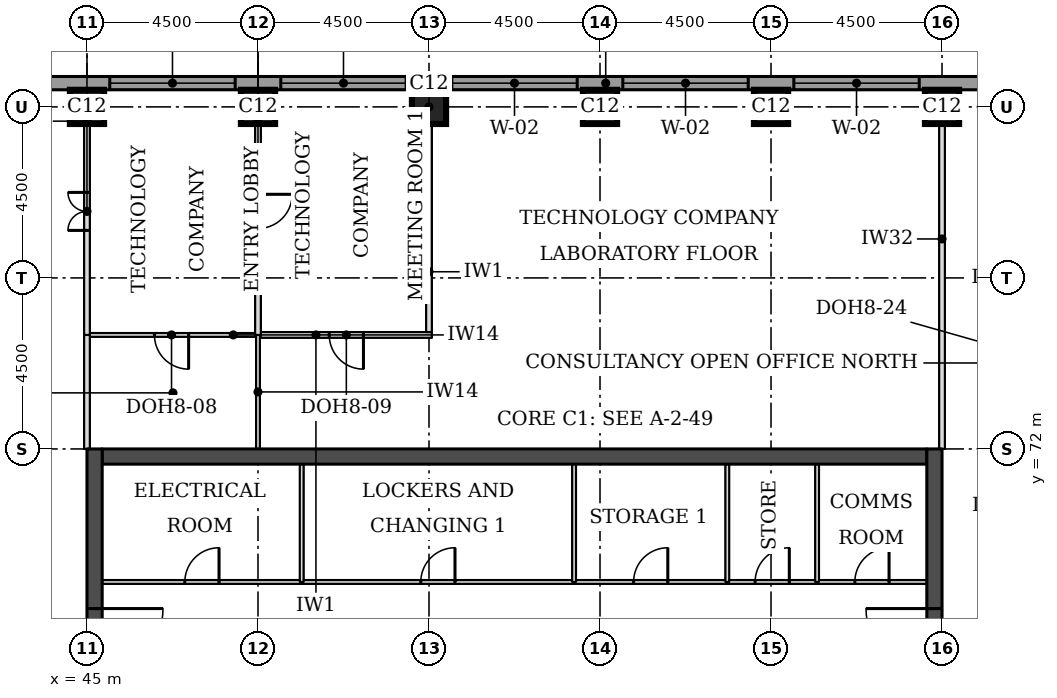
"""IFC4 building model, lengths in metres.
Left out: names, types, materials, properties, quantities, classifications, styles, units other than length and angle.
Written with IfcOpenShell. Run it as: python <this file> out.ifc"""

import sys

from ifc_helpers import new_model, si_unit, direction, frame, frame_2d, origin, origin_2d, place, context, subcontext, project, spatial, rectangle, extrude, element, fill, save


model = new_model("IFC4")
c1 = context("Model", 3, precision=1e-05, world=origin(), true_north=direction((0.0, 1.0)))
c2 = subcontext(c1, "Body", "Model", "MODEL_VIEW")
j1 = project(units=[si_unit("LENGTHUNIT", "METRE"), si_unit("PLANEANGLEUNIT", "RADIAN")], contexts=[c1])
p1 = place(None, origin())
s1 = spatial("IfcSite", under=j1, at=p1, CompositionType="ELEMENT")
p2 = place(p1, origin())
s2 = spatial("IfcBuilding", under=s1, at=p2, CompositionType="ELEMENT")
p3 = place(p2, frame((0.0, 0.0, 199.5)))
s3 = spatial("IfcBuildingStorey", under=s2, at=p3, CompositionType="ELEMENT", Elevation=199.5)
for number, where, z_axis, x_axis in (
    (1, (45.0, 81.0, 0.0), (0.0, 0.0, 1.0), (1.0, 0.0, 0.0)),
    (2, (49.5, 81.0, 0.0), (0.0, 0.0, 1.0), (1.0, 0.0, 0.0)),
    (3, (54.0, 81.0, 0.0), (0.0, 0.0, 1.0), (1.0, 0.0, 0.0)),
    (4, (58.5, 81.0, 0.0), (0.0, 0.0, 1.0), (1.0, 0.0, 0.0)),
    (5, (63.0, 81.0, 0.0), (0.0, 0.0, 1.0), (1.0, 0.0, 0.0)),
    (6, (67.5, 81.0, 0.0), (0.0, 0.0, 1.0), (1.0, 0.0, 0.0)),
):
    element("IfcColumn", number, at=place(p3, frame(where, z_axis=z_axis, x_axis=x_axis)), inside=s3, PredefinedType="COLUMN", context=c2, shape_type="SweptSolid", body=[
        extrude(rectangle(XDim=0.9, YDim=0.9, at=origin_2d()), origin(), (0.0, 0.0, 1.0), 3.7),
    ])
p4 = place(p3, frame((45.4, 71.8, 0.0), z_axis=(0.0, 0.0, 1.0), x_axis=(1.0, 0.0, 0.0)))
e7 = element("IfcWall", 7, at=p4, inside=s3, PredefinedType="SHEAR", context=c2, shape_type="SweptSolid", body=[
    extrude(rectangle(XDim=21.7, YDim=0.4, at=frame_2d((10.85, 0.0))), origin(), (0.0, 0.0, 1.0), 3.7),
])
p5 = place(p3, frame((45.2, 49.5, 0.0), z_axis=(0.0, 0.0, 1.0), x_axis=(0.0, 1.0, 0.0)))
e8 = element("IfcWall", 8, at=p5, inside=s3, PredefinedType="SHEAR", context=c2, shape_type="SweptSolid", body=[
    extrude(rectangle(XDim=22.5, YDim=0.4, at=frame_2d((11.25, 0.0))), origin(), (0.0, 0.0, 1.0), 3.7),
])
p6 = place(p5, frame((4.2, 0.0, 0.0)))
e9 = element("IfcOpeningElement", 9, at=p6, cuts=e8, PredefinedType="OPENING", context=c2, shape_type="SweptSolid", body=[
    extrude(rectangle(XDim=1.8, YDim=2.1, at=frame_2d((0.9, 1.05))), frame((0.0, 0.21, 0.0), z_axis=(0.0, -1.0, 0.0), x_axis=(1.0, 0.0, 0.0)), (0.0, 0.0, 1.0), 0.42),
])
p7 = place(p5, frame((6.9, 0.0, 0.0)))
e10 = element("IfcOpeningElement", 10, at=p7, cuts=e8, PredefinedType="OPENING", context=c2, shape_type="SweptSolid", body=[
    extrude(rectangle(XDim=1.1, YDim=2.1, at=frame_2d((0.55, 1.05))), frame((0.0, 0.21, 0.0), z_axis=(0.0, -1.0, 0.0), x_axis=(1.0, 0.0, 0.0)), (0.0, 0.0, 1.0), 0.42),
])
p8 = place(p5, frame((13.6, 0.0, 0.0)))
e11 = element("IfcOpeningElement", 11, at=p8, cuts=e8, PredefinedType="OPENING", context=c2, shape_type="SweptSolid", body=[
    extrude(rectangle(XDim=1.1, YDim=2.1, at=frame_2d((0.55, 1.05))), frame((0.0, 0.21, 0.0), z_axis=(0.0, -1.0, 0.0), x_axis=(1.0, 0.0, 0.0)), (0.0, 0.0, 1.0), 0.42),
])
p9 = place(p5, frame((16.5, 0.0, 0.0)))
e12 = element("IfcOpeningElement", 12, at=p9, cuts=e8, PredefinedType="OPENING", context=c2, shape_type="SweptSolid", body=[
    extrude(rectangle(XDim=1.8, YDim=2.1, at=frame_2d((0.9, 1.05))), frame((0.0, 0.21, 0.0), z_axis=(0.0, -1.0, 0.0), x_axis=(1.0, 0.0, 0.0)), (0.0, 0.0, 1.0), 0.42),
])
p10 = place(p3, frame((67.3, 49.5, 0.0), z_axis=(0.0, 0.0, 1.0), x_axis=(0.0, 1.0, 0.0)))
e13 = element("IfcWall", 13, at=p10, inside=s3, PredefinedType="SHEAR", context=c2, shape_type="SweptSolid", body=[
    extrude(rectangle(XDim=22.5, YDim=0.4, at=frame_2d((11.25, 0.0))), origin(), (0.0, 0.0, 1.0), 3.7),
])
p11 = place(p10, frame((4.2, 0.0, 0.0)))
e14 = element("IfcOpeningElement", 14, at=p11, cuts=e13, PredefinedType="OPENING", context=c2, shape_type="SweptSolid", body=[
    extrude(rectangle(XDim=1.8, YDim=2.1, at=frame_2d((0.9, 1.05))), frame((0.0, 0.21, 0.0), z_axis=(0.0, -1.0, 0.0), x_axis=(1.0, 0.0, 0.0)), (0.0, 0.0, 1.0), 0.42),
])
p12 = place(p10, frame((6.9, 0.0, 0.0)))
e15 = element("IfcOpeningElement", 15, at=p12, cuts=e13, PredefinedType="OPENING", context=c2, shape_type="SweptSolid", body=[
    extrude(rectangle(XDim=1.1, YDim=2.1, at=frame_2d((0.55, 1.05))), frame((0.0, 0.21, 0.0), z_axis=(0.0, -1.0, 0.0), x_axis=(1.0, 0.0, 0.0)), (0.0, 0.0, 1.0), 0.42),
])
p13 = place(p10, frame((13.6, 0.0, 0.0)))
e16 = element("IfcOpeningElement", 16, at=p13, cuts=e13, PredefinedType="OPENING", context=c2, shape_type="SweptSolid", body=[
    extrude(rectangle(XDim=1.1, YDim=2.1, at=frame_2d((0.55, 1.05))), frame((0.0, 0.21, 0.0), z_axis=(0.0, -1.0, 0.0), x_axis=(1.0, 0.0, 0.0)), (0.0, 0.0, 1.0), 0.42),
])
p14 = place(p10, frame((16.5, 0.0, 0.0)))
e17 = element("IfcOpeningElement", 17, at=p14, cuts=e13, PredefinedType="OPENING", context=c2, shape_type="SweptSolid", body=[
    extrude(rectangle(XDim=1.8, YDim=2.1, at=frame_2d((0.9, 1.05))), frame((0.0, 0.21, 0.0), z_axis=(0.0, -1.0, 0.0), x_axis=(1.0, 0.0, 0.0)), (0.0, 0.0, 1.0), 0.42),
])
p15 = place(p3, frame((72.331, 81.625, 0.0), z_axis=(0.0, 0.0, 1.0), x_axis=(-1.0, 0.0, 0.0)))
e18 = element("IfcWall", 18, at=p15, inside=s3, PredefinedType="STANDARD", context=c2, shape_type="SweptSolid", body=[
    extrude(rectangle(XDim=32.163, YDim=0.35, at=frame_2d((16.081, 0.0))), origin(), (0.0, 0.0, 1.0), 3.525),
])
p16 = place(p15, frame((5.431, 0.0, 0.9)))
e19 = element("IfcOpeningElement", 19, at=p16, cuts=e18, PredefinedType="OPENING", context=c2, shape_type="SweptSolid", body=[
    extrude(rectangle(XDim=3.3, YDim=1.9, at=frame_2d((1.65, 0.95))), frame((0.0, 0.185, 0.0), z_axis=(0.0, -1.0, 0.0), x_axis=(1.0, 0.0, 0.0)), (0.0, 0.0, 1.0), 0.37),
])
p17 = place(p15, frame((9.931, 0.0, 0.9)))
e20 = element("IfcOpeningElement", 20, at=p17, cuts=e18, PredefinedType="OPENING", context=c2, shape_type="SweptSolid", body=[
    extrude(rectangle(XDim=3.3, YDim=1.9, at=frame_2d((1.65, 0.95))), frame((0.0, 0.185, 0.0), z_axis=(0.0, -1.0, 0.0), x_axis=(1.0, 0.0, 0.0)), (0.0, 0.0, 1.0), 0.37),
])
p18 = place(p15, frame((14.431, 0.0, 0.9)))
e21 = element("IfcOpeningElement", 21, at=p18, cuts=e18, PredefinedType="OPENING", context=c2, shape_type="SweptSolid", body=[
    extrude(rectangle(XDim=3.3, YDim=1.9, at=frame_2d((1.65, 0.95))), frame((0.0, 0.185, 0.0), z_axis=(0.0, -1.0, 0.0), x_axis=(1.0, 0.0, 0.0)), (0.0, 0.0, 1.0), 0.37),
])
p19 = place(p15, frame((18.931, 0.0, 0.9)))
e22 = element("IfcOpeningElement", 22, at=p19, cuts=e18, PredefinedType="OPENING", context=c2, shape_type="SweptSolid", body=[
    extrude(rectangle(XDim=3.3, YDim=1.9, at=frame_2d((1.65, 0.95))), frame((0.0, 0.185, 0.0), z_axis=(0.0, -1.0, 0.0), x_axis=(1.0, 0.0, 0.0)), (0.0, 0.0, 1.0), 0.37),
])
p20 = place(p15, frame((23.431, 0.0, 0.9)))
e23 = element("IfcOpeningElement", 23, at=p20, cuts=e18, PredefinedType="OPENING", context=c2, shape_type="SweptSolid", body=[
    extrude(rectangle(XDim=3.3, YDim=1.9, at=frame_2d((1.65, 0.95))), frame((0.0, 0.185, 0.0), z_axis=(0.0, -1.0, 0.0), x_axis=(1.0, 0.0, 0.0)), (0.0, 0.0, 1.0), 0.37),
])
p21 = place(p3, frame((45.075, 75.0, 0.0), z_axis=(0.0, 0.0, 1.0), x_axis=(1.0, 0.0, 0.0)))
e24 = element("IfcWall", 24, at=p21, inside=s3, PredefinedType="PARTITIONING", context=c2, shape_type="SweptSolid", body=[
    extrude(rectangle(XDim=4.35, YDim=0.1, at=frame_2d((2.175, 0.0))), origin(), (0.0, 0.0, 1.0), 3.55),
])
p22 = place(p21, frame((1.7, 0.0, 0.0)))
e25 = element("IfcOpeningElement", 25, at=p22, cuts=e24, PredefinedType="OPENING", context=c2, shape_type="SweptSolid", body=[
    extrude(rectangle(XDim=0.9, YDim=2.1, at=frame_2d((0.45, 1.05))), frame((0.0, 0.06, 0.0), z_axis=(0.0, -1.0, 0.0), x_axis=(1.0, 0.0, 0.0)), (0.0, 0.0, 1.0), 0.12),
])
p23 = place(p3, frame((49.575, 75.0, 0.0), z_axis=(0.0, 0.0, 1.0), x_axis=(1.0, 0.0, 0.0)))
e26 = element("IfcWall", 26, at=p23, inside=s3, PredefinedType="PARTITIONING", context=c2, shape_type="SweptSolid", body=[
    extrude(rectangle(XDim=4.5, YDim=0.15, at=frame_2d((2.25, 0.0))), origin(), (0.0, 0.0, 1.0), 3.55),
])
p24 = place(p23, frame((1.8, 0.0, 0.0)))
e27 = element("IfcOpeningElement", 27, at=p24, cuts=e26, PredefinedType="OPENING", context=c2, shape_type="SweptSolid", body=[
    extrude(rectangle(XDim=0.9, YDim=2.1, at=frame_2d((0.45, 1.05))), frame((0.0, 0.085, 0.0), z_axis=(0.0, -1.0, 0.0), x_axis=(1.0, 0.0, 0.0)), (0.0, 0.0, 1.0), 0.17),
])
p25 = place(p3, frame((45.0, 72.0, 0.0), z_axis=(0.0, 0.0, 1.0), x_axis=(0.0, 1.0, 0.0)))
e28 = element("IfcWall", 28, at=p25, inside=s3, PredefinedType="PARTITIONING", context=c2, shape_type="SweptSolid", body=[
    extrude(rectangle(XDim=3.0, YDim=0.15, at=frame_2d((1.5, 0.0))), origin(), (0.0, 0.0, 1.0), 3.022),
])
p26 = place(p3, frame((49.5, 72.0, 0.0), z_axis=(0.0, 0.0, 1.0), x_axis=(0.0, 1.0, 0.0)))
e29 = element("IfcWall", 29, at=p26, inside=s3, PredefinedType="PARTITIONING", context=c2, shape_type="SweptSolid", body=[
    extrude(rectangle(XDim=3.0, YDim=0.1, at=frame_2d((1.5, 0.0))), origin(), (0.0, 0.0, 1.0), 3.55),
])
p27 = place(p3, frame((67.5, 72.0, 0.0), z_axis=(0.0, 0.0, 1.0), x_axis=(0.0, 1.0, 0.0)))
e30 = element("IfcWall", 30, at=p27, inside=s3, PredefinedType="PARTITIONING", context=c2, shape_type="SweptSolid", body=[
    extrude(rectangle(XDim=9.45, YDim=0.15, at=frame_2d((4.725, 0.0))), origin(), (0.0, 0.0, 1.0), 3.022),
])
p28 = place(p3, frame((45.0, 75.0, 0.0), z_axis=(0.0, 0.0, 1.0), x_axis=(0.0, 1.0, 0.0)))
e31 = element("IfcWall", 31, at=p28, inside=s3, PredefinedType="PARTITIONING", context=c2, shape_type="SweptSolid", body=[
    extrude(rectangle(XDim=6.45, YDim=0.15, at=frame_2d((3.225, 0.0))), origin(), (0.0, 0.0, 1.0), 3.022),
])
p29 = place(p28, frame((2.75, 0.0, 0.0)))
e32 = element("IfcOpeningElement", 32, at=p29, cuts=e31, PredefinedType="OPENING", context=c2, shape_type="SweptSolid", body=[
    extrude(rectangle(XDim=1.0, YDim=2.1, at=frame_2d((0.5, 1.05))), frame((0.0, 0.085, 0.0), z_axis=(0.0, -1.0, 0.0), x_axis=(1.0, 0.0, 0.0)), (0.0, 0.0, 1.0), 0.17),
])
p30 = place(p3, frame((49.5, 75.0, 0.0), z_axis=(0.0, 0.0, 1.0), x_axis=(0.0, 1.0, 0.0)))
e33 = element("IfcWall", 33, at=p30, inside=s3, PredefinedType="PARTITIONING", context=c2, shape_type="SweptSolid", body=[
    extrude(rectangle(XDim=6.45, YDim=0.15, at=frame_2d((3.225, 0.0))), origin(), (0.0, 0.0, 1.0), 3.55),
])
p31 = place(p30, frame((2.8, 0.0, 0.0)))
e34 = element("IfcOpeningElement", 34, at=p31, cuts=e33, PredefinedType="OPENING", context=c2, shape_type="SweptSolid", body=[
    extrude(rectangle(XDim=0.9, YDim=2.1, at=frame_2d((0.45, 1.05))), frame((0.0, 0.085, 0.0), z_axis=(0.0, -1.0, 0.0), x_axis=(1.0, 0.0, 0.0)), (0.0, 0.0, 1.0), 0.17),
])
p32 = place(p3, frame((54.0, 75.075, 0.0), z_axis=(0.0, 0.0, 1.0), x_axis=(0.0, 1.0, 0.0)))
e35 = element("IfcWall", 35, at=p32, inside=s3, PredefinedType="PARTITIONING", context=c2, shape_type="SweptSolid", body=[
    extrude(rectangle(XDim=6.375, YDim=0.15, at=frame_2d((3.188, 0.0))), origin(), (0.0, 0.0, 1.0), 3.55),
])
p33 = place(p3, frame((45.4, 68.5, 0.0), z_axis=(0.0, 0.0, 1.0), x_axis=(1.0, 0.0, 0.0)))
e36 = element("IfcWall", 36, at=p33, inside=s3, PredefinedType="PARTITIONING", context=c2, shape_type="SweptSolid", body=[
    extrude(rectangle(XDim=21.7, YDim=0.1, at=frame_2d((10.85, 0.0))), origin(), (0.0, 0.0, 1.0), 3.55),
])
p34 = place(p33, frame((19.806, 0.0, 0.0)))
e37 = element("IfcOpeningElement", 37, at=p34, cuts=e36, PredefinedType="OPENING", context=c2, shape_type="SweptSolid", body=[
    extrude(rectangle(XDim=0.9, YDim=2.1, at=frame_2d((0.45, 1.05))), frame((0.0, 0.06, 0.0), z_axis=(0.0, -1.0, 0.0), x_axis=(1.0, 0.0, 0.0)), (0.0, 0.0, 1.0), 0.12),
])
p35 = place(p33, frame((17.181, 0.0, 0.0)))
e38 = element("IfcOpeningElement", 38, at=p35, cuts=e36, PredefinedType="OPENING", context=c2, shape_type="SweptSolid", body=[
    extrude(rectangle(XDim=0.9, YDim=2.1, at=frame_2d((0.45, 1.05))), frame((0.0, 0.06, 0.0), z_axis=(0.0, -1.0, 0.0), x_axis=(1.0, 0.0, 0.0)), (0.0, 0.0, 1.0), 0.12),
])
p36 = place(p33, frame((2.175, 0.0, 0.0)))
e39 = element("IfcOpeningElement", 39, at=p36, cuts=e36, PredefinedType="OPENING", context=c2, shape_type="SweptSolid", body=[
    extrude(rectangle(XDim=0.9, YDim=2.1, at=frame_2d((0.45, 1.05))), frame((0.0, 0.06, 0.0), z_axis=(0.0, -1.0, 0.0), x_axis=(1.0, 0.0, 0.0)), (0.0, 0.0, 1.0), 0.12),
])
p37 = place(p33, frame((13.984, 0.0, 0.0)))
e40 = element("IfcOpeningElement", 40, at=p37, cuts=e36, PredefinedType="OPENING", context=c2, shape_type="SweptSolid", body=[
    extrude(rectangle(XDim=0.9, YDim=2.1, at=frame_2d((0.45, 1.05))), frame((0.0, 0.06, 0.0), z_axis=(0.0, -1.0, 0.0), x_axis=(1.0, 0.0, 0.0)), (0.0, 0.0, 1.0), 0.12),
])
p38 = place(p33, frame((8.384, 0.0, 0.0)))
e41 = element("IfcOpeningElement", 41, at=p38, cuts=e36, PredefinedType="OPENING", context=c2, shape_type="SweptSolid", body=[
    extrude(rectangle(XDim=0.9, YDim=2.1, at=frame_2d((0.45, 1.05))), frame((0.0, 0.06, 0.0), z_axis=(0.0, -1.0, 0.0), x_axis=(1.0, 0.0, 0.0)), (0.0, 0.0, 1.0), 0.12),
])
for number, where, z_axis, x_axis in (
    (42, (50.65, 68.5, 0.0), (0.0, 0.0, 1.0), (0.0, 1.0, 0.0)),
    (43, (57.818, 68.5, 0.0), (0.0, 0.0, 1.0), (0.0, 1.0, 0.0)),
    (44, (61.85, 68.5, 0.0), (0.0, 0.0, 1.0), (0.0, 1.0, 0.0)),
    (45, (64.212, 68.5, 0.0), (0.0, 0.0, 1.0), (0.0, 1.0, 0.0)),
):
    element("IfcWall", number, at=place(p3, frame(where, z_axis=z_axis, x_axis=x_axis)), inside=s3, PredefinedType="PARTITIONING", context=c2, shape_type="SweptSolid", body=[
        extrude(rectangle(XDim=3.1, YDim=0.1, at=frame_2d((1.55, 0.0))), origin(), (0.0, 0.0, 1.0), 3.55),
    ])
p39 = place(p16, origin())
e46 = element("IfcWindow", 46, at=p39, inside=s3, PartitioningType="SINGLE_PANEL", PredefinedType="WINDOW", context=c2, shape_type="SweptSolid", body=[
    extrude(rectangle(XDim=3.3, YDim=1.9, at=frame_2d((1.65, 0.95))), frame((0.0, 0.085, 0.0), z_axis=(0.0, -1.0, 0.0), x_axis=(1.0, 0.0, 0.0)), (0.0, 0.0, 1.0), 0.06),
])
fill(e19, e46)
p40 = place(p17, origin())
e47 = element("IfcWindow", 47, at=p40, inside=s3, PartitioningType="SINGLE_PANEL", PredefinedType="WINDOW", context=c2, shape_type="SweptSolid", body=[
    extrude(rectangle(XDim=3.3, YDim=1.9, at=frame_2d((1.65, 0.95))), frame((0.0, 0.085, 0.0), z_axis=(0.0, -1.0, 0.0), x_axis=(1.0, 0.0, 0.0)), (0.0, 0.0, 1.0), 0.06),
])
fill(e20, e47)
p41 = place(p18, origin())
e48 = element("IfcWindow", 48, at=p41, inside=s3, PartitioningType="SINGLE_PANEL", PredefinedType="WINDOW", context=c2, shape_type="SweptSolid", body=[
    extrude(rectangle(XDim=3.3, YDim=1.9, at=frame_2d((1.65, 0.95))), frame((0.0, 0.085, 0.0), z_axis=(0.0, -1.0, 0.0), x_axis=(1.0, 0.0, 0.0)), (0.0, 0.0, 1.0), 0.06),
])
fill(e21, e48)
p42 = place(p19, origin())
e49 = element("IfcWindow", 49, at=p42, inside=s3, PartitioningType="SINGLE_PANEL", PredefinedType="WINDOW", context=c2, shape_type="SweptSolid", body=[
    extrude(rectangle(XDim=3.3, YDim=1.9, at=frame_2d((1.65, 0.95))), frame((0.0, 0.085, 0.0), z_axis=(0.0, -1.0, 0.0), x_axis=(1.0, 0.0, 0.0)), (0.0, 0.0, 1.0), 0.06),
])
fill(e22, e49)
p43 = place(p20, origin())
e50 = element("IfcWindow", 50, at=p43, inside=s3, PartitioningType="SINGLE_PANEL", PredefinedType="WINDOW", context=c2, shape_type="SweptSolid", body=[
    extrude(rectangle(XDim=3.3, YDim=1.9, at=frame_2d((1.65, 0.95))), frame((0.0, 0.085, 0.0), z_axis=(0.0, -1.0, 0.0), x_axis=(1.0, 0.0, 0.0)), (0.0, 0.0, 1.0), 0.06),
])
fill(e23, e50)
p44 = place(p29, origin())
e51 = element("IfcDoor", 51, at=p44, inside=s3, OperationType="DOUBLE_DOOR_SINGLE_SWING", PredefinedType="DOOR", context=c2, shape_type="SweptSolid", body=[
    extrude(rectangle(XDim=1.0, YDim=2.1, at=frame_2d((0.5, 1.05))), frame((0.0, 0.025, 0.0), z_axis=(0.0, -1.0, 0.0), x_axis=(1.0, 0.0, 0.0)), (0.0, 0.0, 1.0), 0.05),
])
fill(e32, e51)
p45 = place(p31, frame((0.9, 0.0, 0.0), z_axis=(0.0, 0.0, 1.0), x_axis=(-1.0, 0.0, 0.0)))
e52 = element("IfcDoor", 52, at=p45, inside=s3, OperationType="SINGLE_SWING_LEFT", PredefinedType="DOOR", context=c2, shape_type="SweptSolid", body=[
    extrude(rectangle(XDim=0.9, YDim=2.1, at=frame_2d((0.45, 1.05))), frame((0.0, 0.025, 0.0), z_axis=(0.0, -1.0, 0.0), x_axis=(1.0, 0.0, 0.0)), (0.0, 0.0, 1.0), 0.05),
])
fill(e34, e52)
p46 = place(p22, frame((0.9, 0.0, 0.0), z_axis=(0.0, 0.0, 1.0), x_axis=(-1.0, 0.0, 0.0)))
e53 = element("IfcDoor", 53, at=p46, inside=s3, OperationType="SINGLE_SWING_LEFT", PredefinedType="DOOR", context=c2, shape_type="SweptSolid", body=[
    extrude(rectangle(XDim=0.9, YDim=2.1, at=frame_2d((0.45, 1.05))), frame((0.0, 0.025, 0.0), z_axis=(0.0, -1.0, 0.0), x_axis=(1.0, 0.0, 0.0)), (0.0, 0.0, 1.0), 0.05),
])
fill(e25, e53)
p47 = place(p24, frame((0.9, 0.0, 0.0), z_axis=(0.0, 0.0, 1.0), x_axis=(-1.0, 0.0, 0.0)))
e54 = element("IfcDoor", 54, at=p47, inside=s3, OperationType="SINGLE_SWING_LEFT", PredefinedType="DOOR", context=c2, shape_type="SweptSolid", body=[
    extrude(rectangle(XDim=0.9, YDim=2.1, at=frame_2d((0.45, 1.05))), frame((0.0, 0.025, 0.0), z_axis=(0.0, -1.0, 0.0), x_axis=(1.0, 0.0, 0.0)), (0.0, 0.0, 1.0), 0.05),
])
fill(e27, e54)
p48 = place(p9, frame((1.8, 0.0, 0.0), z_axis=(0.0, 0.0, 1.0), x_axis=(-1.0, 0.0, 0.0)))
e55 = element("IfcDoor", 55, at=p48, inside=s3, OperationType="SINGLE_SWING_LEFT", PredefinedType="DOOR", context=c2, shape_type="SweptSolid", body=[
    extrude(rectangle(XDim=1.8, YDim=2.1, at=frame_2d((0.9, 1.05))), frame((0.0, 0.025, 0.0), z_axis=(0.0, -1.0, 0.0), x_axis=(1.0, 0.0, 0.0)), (0.0, 0.0, 1.0), 0.05),
])
fill(e12, e55)
p49 = place(p14, origin())
e56 = element("IfcDoor", 56, at=p49, inside=s3, OperationType="SINGLE_SWING_RIGHT", PredefinedType="DOOR", context=c2, shape_type="SweptSolid", body=[
    extrude(rectangle(XDim=1.8, YDim=2.1, at=frame_2d((0.9, 1.05))), frame((0.0, 0.025, 0.0), z_axis=(0.0, -1.0, 0.0), x_axis=(1.0, 0.0, 0.0)), (0.0, 0.0, 1.0), 0.05),
])
fill(e17, e56)
p50 = place(p34, origin())
e57 = element("IfcDoor", 57, at=p50, inside=s3, OperationType="SINGLE_SWING_RIGHT", PredefinedType="DOOR", context=c2, shape_type="SweptSolid", body=[
    extrude(rectangle(XDim=0.9, YDim=2.1, at=frame_2d((0.45, 1.05))), frame((0.0, 0.025, 0.0), z_axis=(0.0, -1.0, 0.0), x_axis=(1.0, 0.0, 0.0)), (0.0, 0.0, 1.0), 0.05),
])
fill(e37, e57)
p51 = place(p35, origin())
e58 = element("IfcDoor", 58, at=p51, inside=s3, OperationType="SINGLE_SWING_RIGHT", PredefinedType="DOOR", context=c2, shape_type="SweptSolid", body=[
    extrude(rectangle(XDim=0.9, YDim=2.1, at=frame_2d((0.45, 1.05))), frame((0.0, 0.025, 0.0), z_axis=(0.0, -1.0, 0.0), x_axis=(1.0, 0.0, 0.0)), (0.0, 0.0, 1.0), 0.05),
])
fill(e38, e58)
p52 = place(p36, origin())
e59 = element("IfcDoor", 59, at=p52, inside=s3, OperationType="SINGLE_SWING_RIGHT", PredefinedType="DOOR", context=c2, shape_type="SweptSolid", body=[
    extrude(rectangle(XDim=0.9, YDim=2.1, at=frame_2d((0.45, 1.05))), frame((0.0, 0.025, 0.0), z_axis=(0.0, -1.0, 0.0), x_axis=(1.0, 0.0, 0.0)), (0.0, 0.0, 1.0), 0.05),
])
fill(e39, e59)
p53 = place(p37, origin())
e60 = element("IfcDoor", 60, at=p53, inside=s3, OperationType="SINGLE_SWING_RIGHT", PredefinedType="DOOR", context=c2, shape_type="SweptSolid", body=[
    extrude(rectangle(XDim=0.9, YDim=2.1, at=frame_2d((0.45, 1.05))), frame((0.0, 0.025, 0.0), z_axis=(0.0, -1.0, 0.0), x_axis=(1.0, 0.0, 0.0)), (0.0, 0.0, 1.0), 0.05),
])
fill(e40, e60)
p54 = place(p38, origin())
e61 = element("IfcDoor", 61, at=p54, inside=s3, OperationType="SINGLE_SWING_RIGHT", PredefinedType="DOOR", context=c2, shape_type="SweptSolid", body=[
    extrude(rectangle(XDim=0.9, YDim=2.1, at=frame_2d((0.45, 1.05))), frame((0.0, 0.025, 0.0), z_axis=(0.0, -1.0, 0.0), x_axis=(1.0, 0.0, 0.0)), (0.0, 0.0, 1.0), 0.05),
])
fill(e41, e61)
save(model, sys.argv[1])
